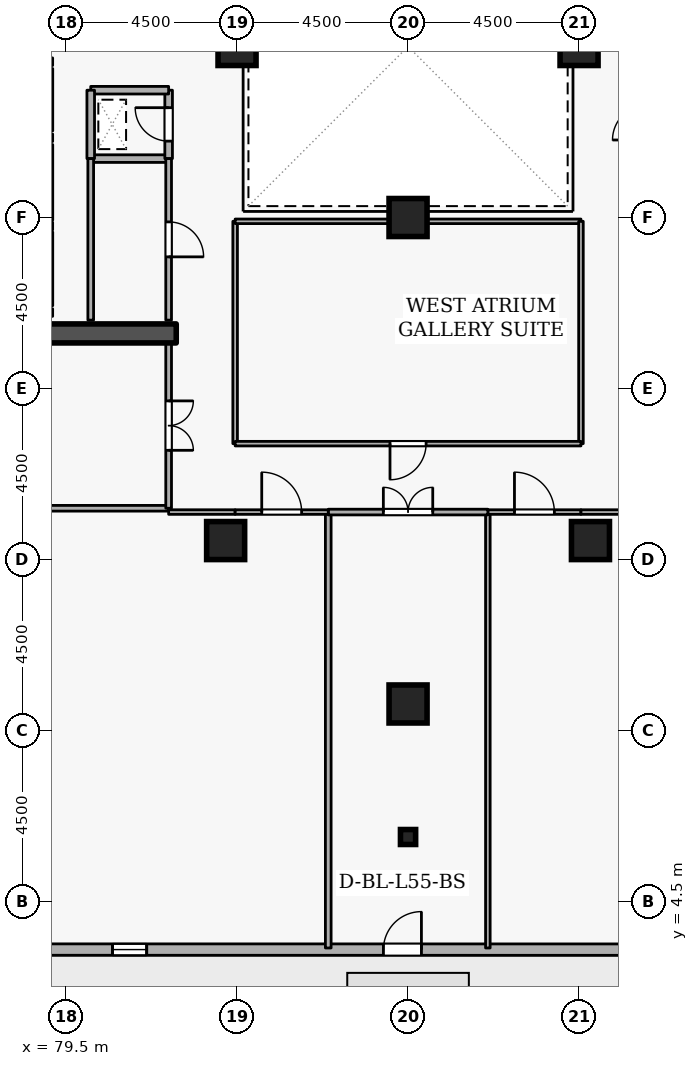
"""IFC4 building model, lengths in metres.
Left out: names, types, materials, properties, quantities, classifications, styles, units other than length and angle.
Written with IfcOpenShell. Run it as: python <this file> out.ifc"""

import sys

from ifc_helpers import new_model, si_unit, direction, frame, frame_2d, origin, origin_2d, place, context, subcontext, project, spatial, rectangle, i_section, extrude, element, fill, save


model = new_model("IFC4")
c1 = context("Model", 3, precision=1e-05, world=origin(), true_north=direction((0.0, 1.0)))
c2 = subcontext(c1, "Body", "Model", "MODEL_VIEW")
j1 = project(units=[si_unit("LENGTHUNIT", "METRE"), si_unit("PLANEANGLEUNIT", "RADIAN")], contexts=[c1])
p1 = place(None, origin())
s1 = spatial("IfcSite", under=j1, at=p1, CompositionType="ELEMENT")
p2 = place(p1, origin())
s2 = spatial("IfcBuilding", under=s1, at=p2, CompositionType="ELEMENT")
p3 = place(p2, frame((0.0, 0.0, 207.3)))
s3 = spatial("IfcBuildingStorey", under=s2, at=p3, CompositionType="ELEMENT", Elevation=207.3)
p4 = place(p3, frame((76.6, 19.45, 0.0), z_axis=(0.0, 0.0, 1.0), x_axis=(1.0, 0.0, 0.0)))
e1 = element("IfcWall", 1, at=p4, inside=s3, PredefinedType="SHEAR", context=c2, shape_type="SweptSolid", body=[
    extrude(rectangle(XDim=5.8, YDim=0.5, at=frame_2d((2.9, 0.0))), origin(), (0.0, 0.0, 1.0), 3.6),
])
for number, where, z_axis, x_axis in (
    (2, (88.5, 9.7, 0.0), (0.0, 0.0, 1.0), (1.0, 0.0, 0.0)),
    (3, (93.3, 14.0, 0.0), (0.0, 0.0, 1.0), (1.0, 0.0, 0.0)),
    (4, (83.7, 14.0, 0.0), (0.0, 0.0, 1.0), (1.0, 0.0, 0.0)),
    (5, (93.0, 27.0, 0.0), (0.0, 0.0, 1.0), (1.0, 0.0, 0.0)),
    (6, (84.0, 27.0, 0.0), (0.0, 0.0, 1.0), (1.0, 0.0, 0.0)),
    (7, (88.5, 22.5, 0.0), (0.0, 0.0, 1.0), (1.0, 0.0, 0.0)),
):
    element("IfcColumn", number, at=place(p3, frame(where, z_axis=z_axis, x_axis=x_axis)), inside=s3, PredefinedType="COLUMN", context=c2, shape_type="SweptSolid", body=[
        extrude(rectangle(XDim=1.0, YDim=1.0, at=origin_2d()), origin(), (0.0, 0.0, 1.0), 3.6),
    ])
p5 = place(p3, frame((88.5, 6.2, 0.0), z_axis=(0.0, 0.0, 1.0), x_axis=(1.0, 0.0, 0.0)))
e8 = element("IfcColumn", 8, at=p5, inside=s3, PredefinedType="COLUMN", context=c2, shape_type="SweptSolid", body=[
    extrude(i_section(OverallWidth=0.399, OverallDepth=0.394, WebThickness=0.023, FlangeThickness=0.037, FilletRadius=0.015, at=origin_2d()), origin(), (0.0, 0.0, 1.0), 3.6),
])
p6 = place(p3, frame((68.422, 3.239, 0.0), z_axis=(0.0, 0.0, 1.0), x_axis=(0.999999994606, -0.000103863011, 0.0)))
e9 = element("IfcWall", 9, at=p6, inside=s3, PredefinedType="STANDARD", context=c2, shape_type="SweptSolid", body=[
    extrude(rectangle(XDim=35.259, YDim=0.3, at=frame_2d((17.629, 0.0))), origin(), (0.0, 0.0, 1.0), 2.7),
])
p7 = place(p6, frame((19.43, 0.0, 0.0)))
e10 = element("IfcOpeningElement", 10, at=p7, cuts=e9, PredefinedType="OPENING", context=c2, shape_type="SweptSolid", body=[
    extrude(rectangle(XDim=1.0, YDim=2.08, at=frame_2d((0.5, 1.04))), frame((0.0, 0.16, 0.0), z_axis=(0.0, -1.0, 0.0), x_axis=(1.0, 0.0, 0.0)), (0.0, 0.0, 1.0), 0.32),
])
p8 = place(p6, frame((2.7, 0.0, 0.72)))
e11 = element("IfcOpeningElement", 11, at=p8, cuts=e9, PredefinedType="OPENING", context=c2, shape_type="SweptSolid", body=[
    extrude(rectangle(XDim=0.9, YDim=1.75, at=frame_2d((0.45, 0.875))), frame((0.0, 0.16, 0.0), z_axis=(0.0, -1.0, 0.0), x_axis=(1.0, 0.0, 0.0)), (0.0, 0.0, 1.0), 0.32),
])
p9 = place(p6, frame((7.5, 0.0, 0.72)))
e12 = element("IfcOpeningElement", 12, at=p9, cuts=e9, PredefinedType="OPENING", context=c2, shape_type="SweptSolid", body=[
    extrude(rectangle(XDim=0.9, YDim=1.75, at=frame_2d((0.45, 0.875))), frame((0.0, 0.16, 0.0), z_axis=(0.0, -1.0, 0.0), x_axis=(1.0, 0.0, 0.0)), (0.0, 0.0, 1.0), 0.32),
])
p10 = place(p6, frame((12.3, 0.0, 0.72)))
e13 = element("IfcOpeningElement", 13, at=p10, cuts=e9, PredefinedType="OPENING", context=c2, shape_type="SweptSolid", body=[
    extrude(rectangle(XDim=0.9, YDim=1.75, at=frame_2d((0.45, 0.875))), frame((0.0, 0.16, 0.0), z_axis=(0.0, -1.0, 0.0), x_axis=(1.0, 0.0, 0.0)), (0.0, 0.0, 1.0), 0.32),
])
p11 = place(p6, frame((26.7, 0.0, 0.72)))
e14 = element("IfcOpeningElement", 14, at=p11, cuts=e9, PredefinedType="OPENING", context=c2, shape_type="SweptSolid", body=[
    extrude(rectangle(XDim=0.9, YDim=1.75, at=frame_2d((0.45, 0.875))), frame((0.0, 0.16, 0.0), z_axis=(0.0, -1.0, 0.0), x_axis=(1.0, 0.0, 0.0)), (0.0, 0.0, 1.0), 0.32),
])
p12 = place(p6, frame((31.5, 0.0, 0.72)))
e15 = element("IfcOpeningElement", 15, at=p12, cuts=e9, PredefinedType="OPENING", context=c2, shape_type="SweptSolid", body=[
    extrude(rectangle(XDim=0.9, YDim=1.75, at=frame_2d((0.45, 0.875))), frame((0.0, 0.16, 0.0), z_axis=(0.0, -1.0, 0.0), x_axis=(1.0, 0.0, 0.0)), (0.0, 0.0, 1.0), 0.32),
])
p13 = place(p3, frame((79.05, 24.78, 0.0), z_axis=(0.0, 0.0, 1.0), x_axis=(0.0, 1.0, 0.0)))
e16 = element("IfcWall", 16, at=p13, inside=s3, PredefinedType="STANDARD", context=c2, shape_type="SweptSolid", body=[
    extrude(rectangle(XDim=1.64, YDim=0.2, at=frame_2d((0.82, 0.0))), origin(), (0.0, 0.0, 1.0), 3.34),
])
p14 = place(p13, frame((0.31, 0.0, 0.0)))
e17 = element("IfcOpeningElement", 17, at=p14, cuts=e16, PredefinedType="OPENING", context=c2, shape_type="SweptSolid", body=[
    extrude(rectangle(XDim=1.02, YDim=2.06, at=frame_2d((0.51, 1.03))), frame((0.0, 0.11, 0.0), z_axis=(0.0, -1.0, 0.0), x_axis=(1.0, 0.0, 0.0)), (0.0, 0.0, 1.0), 0.22),
])
p15 = place(p3, frame((79.05, 22.43, 0.0), z_axis=(0.0, 0.0, 1.0), x_axis=(0.0, 1.0, 0.0)))
e18 = element("IfcWall", 18, at=p15, inside=s3, PredefinedType="STANDARD", context=c2, shape_type="SweptSolid", body=[
    extrude(rectangle(XDim=1.99, YDim=0.2, at=frame_2d((0.995, 0.0))), origin(), (0.0, 0.0, 1.0), 3.34),
])
p16 = place(p15, frame((0.485, 0.0, 0.0)))
e19 = element("IfcOpeningElement", 19, at=p16, cuts=e18, PredefinedType="OPENING", context=c2, shape_type="SweptSolid", body=[
    extrude(rectangle(XDim=1.02, YDim=2.06, at=frame_2d((0.51, 1.03))), frame((0.0, 0.11, 0.0), z_axis=(0.0, -1.0, 0.0), x_axis=(1.0, 0.0, 0.0)), (0.0, 0.0, 1.0), 0.22),
])
p17 = place(p3, frame((79.05, 20.18, 0.0), z_axis=(0.0, 0.0, 1.0), x_axis=(0.0, 1.0, 0.0)))
e20 = element("IfcWall", 20, at=p17, inside=s3, PredefinedType="STANDARD", context=c2, shape_type="SweptSolid", body=[
    extrude(rectangle(XDim=1.94, YDim=0.2, at=frame_2d((0.97, 0.0))), origin(), (0.0, 0.0, 1.0), 3.34),
])
p18 = place(p17, frame((0.46, 0.0, 0.0)))
e21 = element("IfcOpeningElement", 21, at=p18, cuts=e20, PredefinedType="OPENING", context=c2, shape_type="SweptSolid", body=[
    extrude(rectangle(XDim=1.02, YDim=2.06, at=frame_2d((0.51, 1.03))), frame((0.0, 0.11, 0.0), z_axis=(0.0, -1.0, 0.0), x_axis=(1.0, 0.0, 0.0)), (0.0, 0.0, 1.0), 0.22),
])
p19 = place(p3, frame((80.15, 24.05, 0.0), z_axis=(0.0, 0.0, 1.0), x_axis=(1.0, 0.0, 0.0)))
e22 = element("IfcWall", 22, at=p19, inside=s3, PredefinedType="STANDARD", context=c2, shape_type="SweptSolid", body=[
    extrude(rectangle(XDim=2.05, YDim=0.2, at=frame_2d((1.025, 0.0))), origin(), (0.0, 0.0, 1.0), 3.34),
])
p20 = place(p3, frame((82.2, 24.05, 0.0), z_axis=(0.0, 0.0, 1.0), x_axis=(0.0, 1.0, 0.0)))
e23 = element("IfcWall", 23, at=p20, inside=s3, PredefinedType="STANDARD", context=c2, shape_type="SweptSolid", body=[
    extrude(rectangle(XDim=1.8, YDim=0.2, at=frame_2d((0.9, 0.0))), origin(), (0.0, 0.0, 1.0), 3.34),
])
p21 = place(p20, frame((0.46, 0.0, 0.0)))
e24 = element("IfcOpeningElement", 24, at=p21, cuts=e23, PredefinedType="OPENING", context=c2, shape_type="SweptSolid", body=[
    extrude(rectangle(XDim=0.88, YDim=2.04, at=frame_2d((0.44, 1.02))), frame((0.0, 0.11, 0.0), z_axis=(0.0, -1.0, 0.0), x_axis=(1.0, 0.0, 0.0)), (0.0, 0.0, 1.0), 0.22),
])
p22 = place(p3, frame((82.2, 25.85, 0.0), z_axis=(0.0, 0.0, 1.0), x_axis=(-1.0, 0.0, 0.0)))
e25 = element("IfcWall", 25, at=p22, inside=s3, PredefinedType="STANDARD", context=c2, shape_type="SweptSolid", body=[
    extrude(rectangle(XDim=2.05, YDim=0.2, at=frame_2d((1.025, 0.0))), origin(), (0.0, 0.0, 1.0), 3.34),
])
p23 = place(p3, frame((80.15, 25.85, 0.0), z_axis=(0.0, 0.0, 1.0), x_axis=(0.0, -1.0, 0.0)))
e26 = element("IfcWall", 26, at=p23, inside=s3, PredefinedType="STANDARD", context=c2, shape_type="SweptSolid", body=[
    extrude(rectangle(XDim=1.8, YDim=0.2, at=frame_2d((0.9, 0.0))), origin(), (0.0, 0.0, 1.0), 3.34),
])
p24 = place(p3, frame((80.15, 19.8, 0.0), z_axis=(0.0, 0.0, 1.0), x_axis=(0.0, 1.0, 0.0)))
e27 = element("IfcWall", 27, at=p24, inside=s3, PredefinedType="PARTITIONING", context=c2, shape_type="SweptSolid", body=[
    extrude(rectangle(XDim=4.25, YDim=0.15, at=frame_2d((2.125, 0.0))), origin(), (0.0, 0.0, 1.0), 3.34),
])
p25 = place(p3, frame((82.2, 24.05, 0.0), z_axis=(0.0, 0.0, 1.0), x_axis=(0.0, -1.0, 0.0)))
e28 = element("IfcWall", 28, at=p25, inside=s3, PredefinedType="PARTITIONING", context=c2, shape_type="SweptSolid", body=[
    extrude(rectangle(XDim=4.25, YDim=0.15, at=frame_2d((2.125, 0.0))), origin(), (0.0, 0.0, 1.0), 3.34),
])
p26 = place(p25, frame((1.665, 0.0, 0.0)))
e29 = element("IfcOpeningElement", 29, at=p26, cuts=e28, PredefinedType="OPENING", context=c2, shape_type="SweptSolid", body=[
    extrude(rectangle(XDim=0.92, YDim=2.08, at=frame_2d((0.46, 1.04))), frame((0.0, 0.085, 0.0), z_axis=(0.0, -1.0, 0.0), x_axis=(1.0, 0.0, 0.0)), (0.0, 0.0, 1.0), 0.17),
])
p27 = place(p3, frame((82.2, 14.85, 0.0), z_axis=(0.0, 0.0, 1.0), x_axis=(-1.0, 0.0, 0.0)))
e30 = element("IfcWall", 30, at=p27, inside=s3, PredefinedType="PARTITIONING", context=c2, shape_type="SweptSolid", body=[
    extrude(rectangle(XDim=17.42, YDim=0.15, at=frame_2d((8.71, 0.0))), origin(), (0.0, 0.0, 1.0), 3.34),
])
p28 = place(p3, frame((82.2, 19.2, 0.0), z_axis=(0.0, 0.0, 1.0), x_axis=(0.0, -1.0, 0.0)))
e31 = element("IfcWall", 31, at=p28, inside=s3, PredefinedType="PARTITIONING", context=c2, shape_type="SweptSolid", body=[
    extrude(rectangle(XDim=4.35, YDim=0.15, at=frame_2d((2.175, 0.0))), origin(), (0.0, 0.0, 1.0), 3.34),
])
p29 = place(p28, frame((1.525, 0.0, 0.0)))
e32 = element("IfcOpeningElement", 32, at=p29, cuts=e31, PredefinedType="OPENING", context=c2, shape_type="SweptSolid", body=[
    extrude(rectangle(XDim=1.3, YDim=2.12, at=frame_2d((0.65, 1.06))), frame((0.0, 0.085, 0.0), z_axis=(0.0, -1.0, 0.0), x_axis=(1.0, 0.0, 0.0)), (0.0, 0.0, 1.0), 0.17),
])
p30 = place(p3, frame((90.6, 3.28, 0.0), z_axis=(0.0, 0.0, 1.0), x_axis=(0.0, 1.0, 0.0)))
e33 = element("IfcWall", 33, at=p30, inside=s3, PredefinedType="PARTITIONING", context=c2, shape_type="SweptSolid", body=[
    extrude(rectangle(XDim=11.47, YDim=0.12, at=frame_2d((5.735, 0.0))), origin(), (0.0, 0.0, 1.0), 3.34),
])
p31 = place(p3, frame((90.6, 14.75, 0.0), z_axis=(0.0, 0.0, 1.0), x_axis=(1.0, 0.0, 0.0)))
e34 = element("IfcWall", 34, at=p31, inside=s3, PredefinedType="PARTITIONING", context=c2, shape_type="SweptSolid", body=[
    extrude(rectangle(XDim=2.45, YDim=0.12, at=frame_2d((1.225, 0.0))), origin(), (0.0, 0.0, 1.0), 3.34),
])
p32 = place(p31, frame((0.7, 0.0, 0.0)))
e35 = element("IfcOpeningElement", 35, at=p32, cuts=e34, PredefinedType="OPENING", context=c2, shape_type="SweptSolid", body=[
    extrude(rectangle(XDim=1.05, YDim=2.1, at=frame_2d((0.525, 1.05))), frame((0.0, 0.07, 0.0), z_axis=(0.0, -1.0, 0.0), x_axis=(1.0, 0.0, 0.0)), (0.0, 0.0, 1.0), 0.14),
])
p33 = place(p3, frame((93.05, 14.75, 0.0), z_axis=(0.0, 0.0, 1.0), x_axis=(1.0, 0.0, 0.0)))
e36 = element("IfcWall", 36, at=p33, inside=s3, PredefinedType="PARTITIONING", context=c2, shape_type="SweptSolid", body=[
    extrude(rectangle(XDim=1.75, YDim=0.12, at=frame_2d((0.875, 0.0))), origin(), (0.0, 0.0, 1.0), 3.34),
])
p34 = place(p3, frame((86.4, 3.28, 0.0), z_axis=(0.0, 0.0, 1.0), x_axis=(0.0, 1.0, 0.0)))
e37 = element("IfcWall", 37, at=p34, inside=s3, PredefinedType="PARTITIONING", context=c2, shape_type="SweptSolid", body=[
    extrude(rectangle(XDim=11.47, YDim=0.15, at=frame_2d((5.735, 0.0))), origin(), (0.0, 0.0, 1.0), 3.34),
])
p35 = place(p3, frame((86.4, 14.75, 0.0), z_axis=(0.0, 0.0, 1.0), x_axis=(1.0, 0.0, 0.0)))
e38 = element("IfcWall", 38, at=p35, inside=s3, PredefinedType="PARTITIONING", context=c2, shape_type="SweptSolid", body=[
    extrude(rectangle(XDim=4.2, YDim=0.15, at=frame_2d((2.1, 0.0))), origin(), (0.0, 0.0, 1.0), 3.34),
])
p36 = place(p35, frame((1.45, 0.0, 0.0)))
e39 = element("IfcOpeningElement", 39, at=p36, cuts=e38, PredefinedType="OPENING", context=c2, shape_type="SweptSolid", body=[
    extrude(rectangle(XDim=1.3, YDim=2.12, at=frame_2d((0.65, 1.06))), frame((0.0, 0.085, 0.0), z_axis=(0.0, -1.0, 0.0), x_axis=(1.0, 0.0, 0.0)), (0.0, 0.0, 1.0), 0.17),
])
p37 = place(p3, frame((82.2, 14.75, 0.0), z_axis=(0.0, 0.0, 1.0), x_axis=(1.0, 0.0, 0.0)))
e40 = element("IfcWall", 40, at=p37, inside=s3, PredefinedType="PARTITIONING", context=c2, shape_type="SweptSolid", body=[
    extrude(rectangle(XDim=1.75, YDim=0.12, at=frame_2d((0.875, 0.0))), origin(), (0.0, 0.0, 1.0), 3.34),
])
p38 = place(p3, frame((83.95, 14.75, 0.0), z_axis=(0.0, 0.0, 1.0), x_axis=(1.0, 0.0, 0.0)))
e41 = element("IfcWall", 41, at=p38, inside=s3, PredefinedType="PARTITIONING", context=c2, shape_type="SweptSolid", body=[
    extrude(rectangle(XDim=2.45, YDim=0.12, at=frame_2d((1.225, 0.0))), origin(), (0.0, 0.0, 1.0), 3.34),
])
p39 = place(p38, frame((0.7, 0.0, 0.0)))
e42 = element("IfcOpeningElement", 42, at=p39, cuts=e41, PredefinedType="OPENING", context=c2, shape_type="SweptSolid", body=[
    extrude(rectangle(XDim=1.05, YDim=2.1, at=frame_2d((0.525, 1.05))), frame((0.0, 0.07, 0.0), z_axis=(0.0, -1.0, 0.0), x_axis=(1.0, 0.0, 0.0)), (0.0, 0.0, 1.0), 0.14),
])
p40 = place(p3, frame((83.95, 16.55, 0.0), z_axis=(0.0, 0.0, 1.0), x_axis=(0.0, 1.0, 0.0)))
e43 = element("IfcWall", 43, at=p40, inside=s3, PredefinedType="PARTITIONING", context=c2, shape_type="SweptSolid", body=[
    extrude(rectangle(XDim=5.85, YDim=0.12, at=frame_2d((2.925, 0.0))), origin(), (0.0, 0.0, 1.0), 3.34),
])
p41 = place(p3, frame((83.95, 22.4, 0.0), z_axis=(0.0, 0.0, 1.0), x_axis=(1.0, 0.0, 0.0)))
e44 = element("IfcWall", 44, at=p41, inside=s3, PredefinedType="PARTITIONING", context=c2, shape_type="SweptSolid", body=[
    extrude(rectangle(XDim=9.1, YDim=0.12, at=frame_2d((4.55, 0.0))), origin(), (0.0, 0.0, 1.0), 3.34),
])
p42 = place(p3, frame((93.05, 22.4, 0.0), z_axis=(0.0, 0.0, 1.0), x_axis=(0.0, -1.0, 0.0)))
e45 = element("IfcWall", 45, at=p42, inside=s3, PredefinedType="PARTITIONING", context=c2, shape_type="SweptSolid", body=[
    extrude(rectangle(XDim=5.85, YDim=0.12, at=frame_2d((2.925, 0.0))), origin(), (0.0, 0.0, 1.0), 3.34),
])
p43 = place(p3, frame((93.05, 16.55, 0.0), z_axis=(0.0, 0.0, 1.0), x_axis=(-1.0, 0.0, 0.0)))
e46 = element("IfcWall", 46, at=p43, inside=s3, PredefinedType="PARTITIONING", context=c2, shape_type="SweptSolid", body=[
    extrude(rectangle(XDim=9.1, YDim=0.12, at=frame_2d((4.55, 0.0))), origin(), (0.0, 0.0, 1.0), 3.34),
])
p44 = place(p43, frame((4.075, 0.0, 0.0)))
e47 = element("IfcOpeningElement", 47, at=p44, cuts=e46, PredefinedType="OPENING", context=c2, shape_type="SweptSolid", body=[
    extrude(rectangle(XDim=0.95, YDim=2.1, at=frame_2d((0.475, 1.05))), frame((0.0, 0.07, 0.0), z_axis=(0.0, -1.0, 0.0), x_axis=(1.0, 0.0, 0.0)), (0.0, 0.0, 1.0), 0.14),
])
p45 = place(p7, origin())
e48 = element("IfcDoor", 48, at=p45, inside=s3, OperationType="SINGLE_SWING_RIGHT", PredefinedType="DOOR", context=c2, shape_type="SweptSolid", body=[
    extrude(rectangle(XDim=1.0, YDim=2.08, at=frame_2d((0.5, 1.04))), frame((0.0, 0.025, 0.0), z_axis=(0.0, -1.0, 0.0), x_axis=(1.0, 0.0, 0.0)), (0.0, 0.0, 1.0), 0.05),
])
fill(e10, e48)
p46 = place(p10, origin())
e49 = element("IfcWindow", 49, at=p46, inside=s3, PartitioningType="SINGLE_PANEL", PredefinedType="WINDOW", context=c2, shape_type="SweptSolid", body=[
    extrude(rectangle(XDim=0.9, YDim=1.75, at=frame_2d((0.45, 0.875))), frame((0.0, 0.03, 0.0), z_axis=(0.0, -1.0, 0.0), x_axis=(1.0, 0.0, 0.0)), (0.0, 0.0, 1.0), 0.06),
])
fill(e13, e49)
p47 = place(p21, origin())
e50 = element("IfcDoor", 50, at=p47, inside=s3, OperationType="SINGLE_SWING_RIGHT", PredefinedType="DOOR", context=c2, shape_type="SweptSolid", body=[
    extrude(rectangle(XDim=0.88, YDim=2.04, at=frame_2d((0.44, 1.02))), frame((0.0, 0.025, 0.0), z_axis=(0.0, -1.0, 0.0), x_axis=(1.0, 0.0, 0.0)), (0.0, 0.0, 1.0), 0.05),
])
fill(e24, e50)
p48 = place(p26, origin())
e51 = element("IfcDoor", 51, at=p48, inside=s3, OperationType="SINGLE_SWING_RIGHT", PredefinedType="DOOR", context=c2, shape_type="SweptSolid", body=[
    extrude(rectangle(XDim=0.92, YDim=2.08, at=frame_2d((0.46, 1.04))), frame((0.0, 0.025, 0.0), z_axis=(0.0, -1.0, 0.0), x_axis=(1.0, 0.0, 0.0)), (0.0, 0.0, 1.0), 0.05),
])
fill(e29, e51)
p49 = place(p29, origin())
e52 = element("IfcDoor", 52, at=p49, inside=s3, OperationType="DOUBLE_DOOR_SINGLE_SWING", PredefinedType="DOOR", context=c2, shape_type="SweptSolid", body=[
    extrude(rectangle(XDim=1.3, YDim=2.12, at=frame_2d((0.65, 1.06))), frame((0.0, 0.025, 0.0), z_axis=(0.0, -1.0, 0.0), x_axis=(1.0, 0.0, 0.0)), (0.0, 0.0, 1.0), 0.05),
])
fill(e32, e52)
p50 = place(p32, origin())
e53 = element("IfcDoor", 53, at=p50, inside=s3, OperationType="SINGLE_SWING_LEFT", PredefinedType="DOOR", context=c2, shape_type="SweptSolid", body=[
    extrude(rectangle(XDim=1.05, YDim=2.1, at=frame_2d((0.525, 1.05))), frame((0.0, 0.025, 0.0), z_axis=(0.0, -1.0, 0.0), x_axis=(1.0, 0.0, 0.0)), (0.0, 0.0, 1.0), 0.05),
])
fill(e35, e53)
p51 = place(p36, origin())
e54 = element("IfcDoor", 54, at=p51, inside=s3, OperationType="DOUBLE_DOOR_SINGLE_SWING", PredefinedType="DOOR", context=c2, shape_type="SweptSolid", body=[
    extrude(rectangle(XDim=1.3, YDim=2.12, at=frame_2d((0.65, 1.06))), frame((0.0, 0.025, 0.0), z_axis=(0.0, -1.0, 0.0), x_axis=(1.0, 0.0, 0.0)), (0.0, 0.0, 1.0), 0.05),
])
fill(e39, e54)
p52 = place(p39, origin())
e55 = element("IfcDoor", 55, at=p52, inside=s3, OperationType="SINGLE_SWING_LEFT", PredefinedType="DOOR", context=c2, shape_type="SweptSolid", body=[
    extrude(rectangle(XDim=1.05, YDim=2.1, at=frame_2d((0.525, 1.05))), frame((0.0, 0.025, 0.0), z_axis=(0.0, -1.0, 0.0), x_axis=(1.0, 0.0, 0.0)), (0.0, 0.0, 1.0), 0.05),
])
fill(e42, e55)
p53 = place(p44, origin())
e56 = element("IfcDoor", 56, at=p53, inside=s3, OperationType="SINGLE_SWING_RIGHT", PredefinedType="DOOR", context=c2, shape_type="SweptSolid", body=[
    extrude(rectangle(XDim=0.95, YDim=2.1, at=frame_2d((0.475, 1.05))), frame((0.0, 0.025, 0.0), z_axis=(0.0, -1.0, 0.0), x_axis=(1.0, 0.0, 0.0)), (0.0, 0.0, 1.0), 0.05),
])
fill(e47, e56)
save(model, sys.argv[1])
